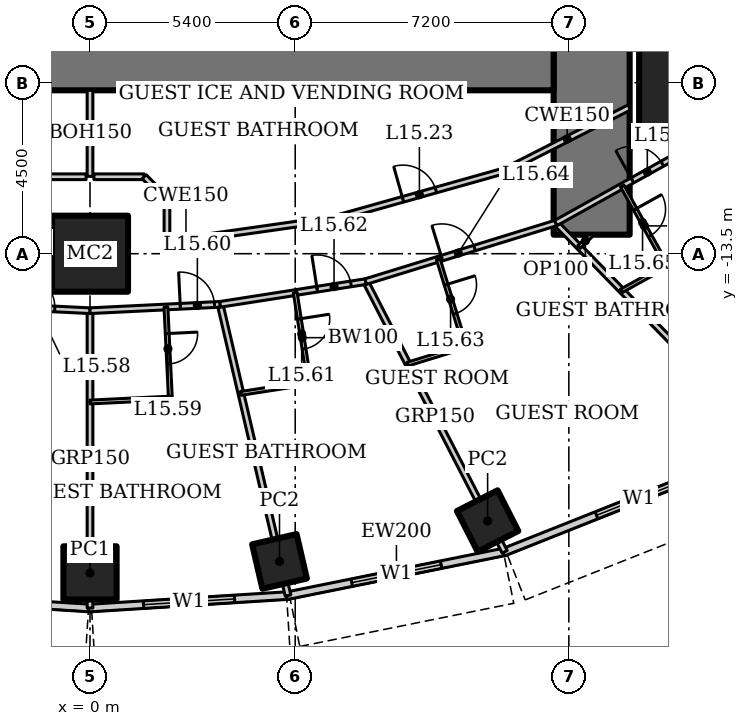
"""IFC4 building model, lengths in metres.
Left out: names, types, materials, properties, quantities, classifications, styles, units other than length and angle.
Written with IfcOpenShell. Run it as: python <this file> out.ifc"""

import sys

from ifc_helpers import new_model, si_unit, direction, frame, frame_2d, origin, origin_2d, place, context, subcontext, project, spatial, rectangle, hollow_rectangle, extrude, element, fill, save


model = new_model("IFC4")
c1 = context("Model", 3, precision=1e-05, world=origin(), true_north=direction((0.0, 1.0)))
c2 = subcontext(c1, "Body", "Model", "MODEL_VIEW")
j1 = project(units=[si_unit("LENGTHUNIT", "METRE"), si_unit("PLANEANGLEUNIT", "RADIAN")], contexts=[c1])
p1 = place(None, origin())
s1 = spatial("IfcSite", under=j1, at=p1, CompositionType="ELEMENT")
p2 = place(p1, origin())
s2 = spatial("IfcBuilding", under=s1, at=p2, CompositionType="ELEMENT")
p3 = place(p2, frame((0.0, 0.0, 69.4)))
s3 = spatial("IfcBuildingStorey", under=s2, at=p3, CompositionType="ELEMENT", Elevation=69.4)
p4 = place(p3, frame((0.0, -13.5, 0.0), z_axis=(0.0, 0.0, 1.0), x_axis=(1.0, 0.0, 0.0)))
e1 = element("IfcColumn", 1, at=p4, inside=s3, PredefinedType="COLUMN", context=c2, shape_type="SweptSolid", body=[
    extrude(hollow_rectangle(XDim=2.0, YDim=2.0, WallThickness=0.17, at=origin_2d()), origin(), (0.0, 0.0, 1.0), 3.6),
])
p5 = place(p3, frame((15.75, -9.0, 0.0), z_axis=(0.0, 0.0, 1.0), x_axis=(1.0, 0.0, 0.0)))
e2 = element("IfcColumn", 2, at=p5, inside=s3, PredefinedType="COLUMN", context=c2, shape_type="SweptSolid", body=[
    extrude(hollow_rectangle(XDim=2.6, YDim=2.6, WallThickness=0.13, at=origin_2d()), origin(), (0.0, 0.0, 1.0), 3.6),
])
p6 = place(p3, frame((0.0, -21.9, 0.0), z_axis=(0.0, 0.0, 1.0), x_axis=(1.0, 0.0, 0.0)))
e3 = element("IfcColumn", 3, at=p6, inside=s3, PredefinedType="COLUMN", context=c2, shape_type="SweptSolid", body=[
    extrude(hollow_rectangle(XDim=1.4, YDim=1.4, WallThickness=0.1, at=origin_2d()), origin(), (0.0, 0.0, 1.0), 3.6),
])
for number, where, z_axis, x_axis in (
    (4, (4.986, -21.598, 0.0), (0.0, 0.0, 1.0), (0.974, 0.225, 0.0)),
    (5, (10.463, -20.534, 0.0), (0.0, 0.0, 1.0), (0.891, 0.454, 0.0)),
):
    element("IfcColumn", number, at=place(p3, frame(where, z_axis=z_axis, x_axis=x_axis)), inside=s3, PredefinedType="COLUMN", context=c2, shape_type="SweptSolid", body=[
        extrude(hollow_rectangle(XDim=1.2, YDim=1.2, WallThickness=0.1, at=origin_2d()), origin(), (0.0, 0.0, 1.0), 3.6),
    ])
p7 = place(p3, frame((13.2, -13.0, 0.0), z_axis=(0.0, 0.0, 1.0), x_axis=(0.0, 1.0, 0.0)))
e6 = element("IfcWall", 6, at=p7, inside=s3, PredefinedType="SHEAR", context=c2, shape_type="SweptSolid", body=[
    extrude(rectangle(XDim=26.0, YDim=2.0, at=frame_2d((13.0, 0.0))), origin(), (0.0, 0.0, 1.0), 3.6),
])
p8 = place(p7, frame((12.1, 0.0, 0.0)))
e7 = element("IfcOpeningElement", 7, at=p8, cuts=e6, PredefinedType="OPENING", context=c2, shape_type="SweptSolid", body=[
    extrude(rectangle(XDim=1.8, YDim=2.1, at=frame_2d((0.9, 1.05))), frame((0.0, 1.01, 0.0), z_axis=(0.0, -1.0, 0.0), x_axis=(1.0, 0.0, 0.0)), (0.0, 0.0, 1.0), 2.02),
])
p9 = place(p3, frame((-12.2, -8.0, 0.0), z_axis=(0.0, 0.0, 1.0), x_axis=(1.0, 0.0, 0.0)))
e8 = element("IfcWall", 8, at=p9, inside=s3, PredefinedType="SHEAR", context=c2, shape_type="SweptSolid", body=[
    extrude(rectangle(XDim=24.4, YDim=2.4, at=frame_2d((12.2, 0.0))), origin(), (0.0, 0.0, 1.0), 3.6),
])
p10 = place(p3, frame((-5.253, -22.493, 0.0), z_axis=(0.0, 0.0, 1.0), x_axis=(0.998018582375, -0.062919863585, 0.0)))
e9 = element("IfcWall", 9, at=p10, inside=s3, PredefinedType="SOLIDWALL", context=c2, shape_type="SweptSolid", body=[
    extrude(rectangle(XDim=5.304, YDim=0.2, at=frame_2d((2.652, 0.0))), origin(), (0.0, 0.0, 1.0), 3.45),
])
p11 = place(p10, frame((1.452, 0.0, 0.5)))
e10 = element("IfcOpeningElement", 10, at=p11, cuts=e9, PredefinedType="OPENING", context=c2, shape_type="SweptSolid", body=[
    extrude(rectangle(XDim=2.4, YDim=2.2, at=frame_2d((1.2, 1.1))), frame((0.0, 0.11, 0.0), z_axis=(0.0, -1.0, 0.0), x_axis=(1.0, 0.0, 0.0)), (0.0, 0.0, 1.0), 0.22),
])
p12 = place(p3, frame((-0.041, -22.827, 0.0), z_axis=(0.0, 0.0, 1.0), x_axis=(0.998018582375, 0.062919863585, 0.0)))
e11 = element("IfcWall", 11, at=p12, inside=s3, PredefinedType="SOLIDWALL", context=c2, shape_type="SweptSolid", body=[
    extrude(rectangle(XDim=5.304, YDim=0.2, at=frame_2d((2.652, 0.0))), origin(), (0.0, 0.0, 1.0), 3.45),
])
p13 = place(p12, frame((1.452, 0.0, 0.5)))
e12 = element("IfcOpeningElement", 12, at=p13, cuts=e11, PredefinedType="OPENING", context=c2, shape_type="SweptSolid", body=[
    extrude(rectangle(XDim=2.4, YDim=2.2, at=frame_2d((1.2, 1.1))), frame((0.0, 0.11, 0.0), z_axis=(0.0, -1.0, 0.0), x_axis=(1.0, 0.0, 0.0)), (0.0, 0.0, 1.0), 0.22),
])
p14 = place(p3, frame((5.17, -22.504, 0.0), z_axis=(0.0, 0.0, 1.0), x_axis=(0.980251657452, 0.197754110105, 0.0)))
e13 = element("IfcWall", 13, at=p14, inside=s3, PredefinedType="SOLIDWALL", context=c2, shape_type="SweptSolid", body=[
    extrude(rectangle(XDim=5.904, YDim=0.2, at=frame_2d((2.952, 0.0))), origin(), (0.0, 0.0, 1.0), 3.45),
])
p15 = place(p14, frame((1.752, 0.0, 0.5)))
e14 = element("IfcOpeningElement", 14, at=p15, cuts=e13, PredefinedType="OPENING", context=c2, shape_type="SweptSolid", body=[
    extrude(rectangle(XDim=2.4, YDim=2.2, at=frame_2d((1.2, 1.1))), frame((0.0, 0.11, 0.0), z_axis=(0.0, -1.0, 0.0), x_axis=(1.0, 0.0, 0.0)), (0.0, 0.0, 1.0), 0.22),
])
p16 = place(p3, frame((10.869, -21.363, 0.0), z_axis=(0.0, 0.0, 1.0), x_axis=(0.929358351251, 0.369178892895, 0.0)))
e15 = element("IfcWall", 15, at=p16, inside=s3, PredefinedType="SOLIDWALL", context=c2, shape_type="SweptSolid", body=[
    extrude(rectangle(XDim=7.692, YDim=0.2, at=frame_2d((3.846, 0.0))), origin(), (0.0, 0.0, 1.0), 3.45),
])
p17 = place(p16, frame((2.646, 0.0, 0.5)))
e16 = element("IfcOpeningElement", 16, at=p17, cuts=e15, PredefinedType="OPENING", context=c2, shape_type="SweptSolid", body=[
    extrude(rectangle(XDim=2.4, YDim=2.2, at=frame_2d((1.2, 1.1))), frame((0.0, 0.11, 0.0), z_axis=(0.0, -1.0, 0.0), x_axis=(1.0, 0.0, 0.0)), (0.0, 0.0, 1.0), 0.22),
])
p18 = place(p3, frame((0.0, -22.825, 0.0), z_axis=(0.0, 0.0, 1.0), x_axis=(0.0, 1.0, 0.0)))
e17 = element("IfcWall", 17, at=p18, inside=s3, PredefinedType="PARTITIONING", context=c2, shape_type="SweptSolid", body=[
    extrude(rectangle(XDim=7.825, YDim=0.15, at=frame_2d((3.912, 0.0))), origin(), (0.0, 0.0, 1.0), 2.924),
])
p19 = place(p3, frame((5.211, -22.496, 0.0), z_axis=(0.0, 0.0, 1.0), x_axis=(-0.227056984461, 0.973881474209, 0.0)))
e18 = element("IfcWall", 18, at=p19, inside=s3, PredefinedType="PARTITIONING", context=c2, shape_type="SweptSolid", body=[
    extrude(rectangle(XDim=7.869, YDim=0.15, at=frame_2d((3.934, 0.0))), origin(), (0.0, 0.0, 1.0), 2.767),
])
p20 = place(p3, frame((10.912, -21.346, 0.0), z_axis=(0.0, 0.0, 1.0), x_axis=(-0.45752665959, 0.889195904042, 0.0)))
e19 = element("IfcWall", 19, at=p20, inside=s3, PredefinedType="PARTITIONING", context=c2, shape_type="SweptSolid", body=[
    extrude(rectangle(XDim=7.997, YDim=0.15, at=frame_2d((3.999, 0.0))), origin(), (0.0, 0.0, 1.0), 2.528),
])
p21 = place(p3, frame((17.97, -18.542, 0.0), z_axis=(0.0, 0.0, 1.0), x_axis=(-0.698757291878, 0.715358823981, 0.0)))
e20 = element("IfcWall", 20, at=p21, inside=s3, PredefinedType="PARTITIONING", context=c2, shape_type="SweptSolid", body=[
    extrude(rectangle(XDim=8.177, YDim=0.15, at=frame_2d((4.088, 0.0))), origin(), (0.0, 0.0, 1.0), 2.528),
])
p22 = place(p3, frame((-3.424, -14.833, 0.0), z_axis=(0.0, 0.0, 1.0), x_axis=(0.998809560203, -0.048779733975, 0.0)))
e21 = element("IfcWall", 21, at=p22, inside=s3, PredefinedType="PARTITIONING", context=c2, shape_type="SweptSolid", body=[
    extrude(rectangle(XDim=3.428, YDim=0.15, at=frame_2d((1.714, 0.0))), origin(), (0.0, 0.0, 1.0), 3.45),
])
p23 = place(p22, frame((1.6, 0.0, 0.0)))
e22 = element("IfcOpeningElement", 22, at=p23, cuts=e21, PredefinedType="OPENING", context=c2, shape_type="SweptSolid", body=[
    extrude(rectangle(XDim=0.9, YDim=2.1, at=frame_2d((0.45, 1.05))), frame((0.0, 0.085, 0.0), z_axis=(0.0, -1.0, 0.0), x_axis=(1.0, 0.0, 0.0)), (0.0, 0.0, 1.0), 0.17),
])
p24 = place(p3, frame((0.0, -15.0, 0.0), z_axis=(0.0, 0.0, 1.0), x_axis=(0.998809560203, 0.048779733975, 0.0)))
e23 = element("IfcWall", 23, at=p24, inside=s3, PredefinedType="PARTITIONING", context=c2, shape_type="SweptSolid", body=[
    extrude(rectangle(XDim=3.428, YDim=0.15, at=frame_2d((1.714, 0.0))), origin(), (0.0, 0.0, 1.0), 3.45),
])
p25 = place(p24, frame((2.378, 0.0, 0.0)))
e24 = element("IfcOpeningElement", 24, at=p25, cuts=e23, PredefinedType="OPENING", context=c2, shape_type="SweptSolid", body=[
    extrude(rectangle(XDim=0.9, YDim=2.1, at=frame_2d((0.45, 1.05))), frame((0.0, 0.085, 0.0), z_axis=(0.0, -1.0, 0.0), x_axis=(1.0, 0.0, 0.0)), (0.0, 0.0, 1.0), 0.17),
])
p26 = place(p3, frame((3.424, -14.833, 0.0), z_axis=(0.0, 0.0, 1.0), x_axis=(0.988015036573, 0.154357660987, 0.0)))
e25 = element("IfcWall", 25, at=p26, inside=s3, PredefinedType="PARTITIONING", context=c2, shape_type="SweptSolid", body=[
    extrude(rectangle(XDim=3.875, YDim=0.15, at=frame_2d((1.938, 0.0))), origin(), (0.0, 0.0, 1.0), 3.45),
])
p27 = place(p26, frame((2.583, 0.0, 0.0)))
e26 = element("IfcOpeningElement", 26, at=p27, cuts=e25, PredefinedType="OPENING", context=c2, shape_type="SweptSolid", body=[
    extrude(rectangle(XDim=0.9, YDim=2.1, at=frame_2d((0.45, 1.05))), frame((0.0, 0.085, 0.0), z_axis=(0.0, -1.0, 0.0), x_axis=(1.0, 0.0, 0.0)), (0.0, 0.0, 1.0), 0.17),
])
p28 = place(p3, frame((7.253, -14.235, 0.0), z_axis=(0.0, 0.0, 1.0), x_axis=(0.955657956744, 0.294478980085, 0.0)))
e27 = element("IfcWall", 27, at=p28, inside=s3, PredefinedType="PARTITIONING", context=c2, shape_type="SweptSolid", body=[
    extrude(rectangle(XDim=5.236, YDim=0.15, at=frame_2d((2.618, 0.0))), origin(), (0.0, 0.0, 1.0), 3.45),
])
p29 = place(p28, frame((2.1, 0.0, 0.0)))
e28 = element("IfcOpeningElement", 28, at=p29, cuts=e27, PredefinedType="OPENING", context=c2, shape_type="SweptSolid", body=[
    extrude(rectangle(XDim=0.9, YDim=2.1, at=frame_2d((0.45, 1.05))), frame((0.0, 0.085, 0.0), z_axis=(0.0, -1.0, 0.0), x_axis=(1.0, 0.0, 0.0)), (0.0, 0.0, 1.0), 0.17),
])
p30 = place(p3, frame((12.257, -12.693, 0.0), z_axis=(0.0, 0.0, 1.0), x_axis=(0.873695910579, 0.486472461541, 0.0)))
e29 = element("IfcWall", 29, at=p30, inside=s3, PredefinedType="PARTITIONING", context=c2, shape_type="SweptSolid", body=[
    extrude(rectangle(XDim=5.771, YDim=0.15, at=frame_2d((2.885, 0.0))), origin(), (0.0, 0.0, 1.0), 3.45),
])
p31 = place(p30, frame((2.306, 0.0, 0.0)))
e30 = element("IfcOpeningElement", 30, at=p31, cuts=e29, PredefinedType="OPENING", context=c2, shape_type="SweptSolid", body=[
    extrude(rectangle(XDim=0.9, YDim=2.1, at=frame_2d((0.45, 1.05))), frame((0.0, 0.085, 0.0), z_axis=(0.0, -1.0, 0.0), x_axis=(1.0, 0.0, 0.0)), (0.0, 0.0, 1.0), 0.17),
])
p32 = place(p3, frame((3.016, -13.066, 0.0), z_axis=(0.0, 0.0, 1.0), x_axis=(0.990002114939, 0.14105251652, 0.0)))
e31 = element("IfcWall", 31, at=p32, inside=s3, PredefinedType="PARTITIONING", context=c2, shape_type="SweptSolid", body=[
    extrude(rectangle(XDim=3.429, YDim=0.15, at=frame_2d((1.714, 0.0))), origin(), (0.0, 0.0, 1.0), 3.45),
])
p33 = place(p3, frame((6.411, -12.582, 0.0), z_axis=(0.0, 0.0, 1.0), x_axis=(0.962643729928, 0.270771211967, 0.0)))
e32 = element("IfcWall", 32, at=p33, inside=s3, PredefinedType="PARTITIONING", context=c2, shape_type="SweptSolid", body=[
    extrude(rectangle(XDim=4.688, YDim=0.15, at=frame_2d((2.344, 0.0))), origin(), (0.0, 0.0, 1.0), 3.45),
])
p34 = place(p33, frame((1.894, 0.0, 0.0)))
e33 = element("IfcOpeningElement", 33, at=p34, cuts=e32, PredefinedType="OPENING", context=c2, shape_type="SweptSolid", body=[
    extrude(rectangle(XDim=0.9, YDim=2.1, at=frame_2d((0.45, 1.05))), frame((0.0, 0.085, 0.0), z_axis=(0.0, -1.0, 0.0), x_axis=(1.0, 0.0, 0.0)), (0.0, 0.0, 1.0), 0.17),
])
p35 = place(p3, frame((1.998, -14.903, 0.0), z_axis=(0.0, 0.0, 1.0), x_axis=(0.048831470304, -0.998807032168, 0.0)))
e34 = element("IfcWall", 34, at=p35, inside=s3, PredefinedType="PARTITIONING", context=c2, shape_type="SweptSolid", body=[
    extrude(rectangle(XDim=2.4, YDim=0.1, at=frame_2d((1.2, 0.0))), origin(), (0.0, 0.0, 1.0), 2.749),
])
p36 = place(p35, frame((0.7, 0.0, 0.0)))
e35 = element("IfcOpeningElement", 35, at=p36, cuts=e34, PredefinedType="OPENING", context=c2, shape_type="SweptSolid", body=[
    extrude(rectangle(XDim=0.8, YDim=2.1, at=frame_2d((0.4, 1.05))), frame((0.0, 0.06, 0.0), z_axis=(0.0, -1.0, 0.0), x_axis=(1.0, 0.0, 0.0)), (0.0, 0.0, 1.0), 0.12),
])
p37 = place(p3, frame((2.115, -17.3, 0.0), z_axis=(0.0, 0.0, 1.0), x_axis=(-0.998809749254, -0.048775862842, 0.0)))
e36 = element("IfcWall", 36, at=p37, inside=s3, PredefinedType="PARTITIONING", context=c2, shape_type="SweptSolid", body=[
    extrude(rectangle(XDim=2.117, YDim=0.1, at=frame_2d((1.059, 0.0))), origin(), (0.0, 0.0, 1.0), 3.45),
])
p38 = place(p3, frame((5.4, -14.524, 0.0), z_axis=(0.0, 0.0, 1.0), x_axis=(0.154426532979, -0.988004274238, 0.0)))
e37 = element("IfcWall", 37, at=p38, inside=s3, PredefinedType="PARTITIONING", context=c2, shape_type="SweptSolid", body=[
    extrude(rectangle(XDim=2.4, YDim=0.1, at=frame_2d((1.2, 0.0))), origin(), (0.0, 0.0, 1.0), 3.45),
])
p39 = place(p38, frame((0.7, 0.0, 0.0)))
e38 = element("IfcOpeningElement", 38, at=p39, cuts=e37, PredefinedType="OPENING", context=c2, shape_type="SweptSolid", body=[
    extrude(rectangle(XDim=0.8, YDim=2.1, at=frame_2d((0.4, 1.05))), frame((0.0, 0.06, 0.0), z_axis=(0.0, -1.0, 0.0), x_axis=(1.0, 0.0, 0.0)), (0.0, 0.0, 1.0), 0.12),
])
p40 = place(p3, frame((5.771, -16.895, 0.0), z_axis=(0.0, 0.0, 1.0), x_axis=(-0.98801840204, -0.154336117711, 0.0)))
e39 = element("IfcWall", 39, at=p40, inside=s3, PredefinedType="PARTITIONING", context=c2, shape_type="SweptSolid", body=[
    extrude(rectangle(XDim=1.827, YDim=0.1, at=frame_2d((0.914, 0.0))), origin(), (0.0, 0.0, 1.0), 3.45),
])
p41 = place(p3, frame((9.164, -13.646, 0.0), z_axis=(0.0, 0.0, 1.0), x_axis=(0.294507586191, -0.955649141514, 0.0)))
e40 = element("IfcWall", 40, at=p41, inside=s3, PredefinedType="PARTITIONING", context=c2, shape_type="SweptSolid", body=[
    extrude(rectangle(XDim=2.4, YDim=0.1, at=frame_2d((1.2, 0.0))), origin(), (0.0, 0.0, 1.0), 3.45),
])
p42 = place(p41, frame((0.7, 0.0, 0.0)))
e41 = element("IfcOpeningElement", 41, at=p42, cuts=e40, PredefinedType="OPENING", context=c2, shape_type="SweptSolid", body=[
    extrude(rectangle(XDim=0.8, YDim=2.1, at=frame_2d((0.4, 1.05))), frame((0.0, 0.06, 0.0), z_axis=(0.0, -1.0, 0.0), x_axis=(1.0, 0.0, 0.0)), (0.0, 0.0, 1.0), 0.12),
])
p43 = place(p3, frame((9.871, -15.939, 0.0), z_axis=(0.0, 0.0, 1.0), x_axis=(-0.955642133669, -0.29453032502, 0.0)))
e42 = element("IfcWall", 42, at=p43, inside=s3, PredefinedType="PARTITIONING", context=c2, shape_type="SweptSolid", body=[
    extrude(rectangle(XDim=1.583, YDim=0.1, at=frame_2d((0.791, 0.0))), origin(), (0.0, 0.0, 1.0), 3.45),
])
p44 = place(p3, frame((14.004, -11.719, 0.0), z_axis=(0.0, 0.0, 1.0), x_axis=(0.486445964861, -0.873710663361, 0.0)))
e43 = element("IfcWall", 43, at=p44, inside=s3, PredefinedType="PARTITIONING", context=c2, shape_type="SweptSolid", body=[
    extrude(rectangle(XDim=2.4, YDim=0.1, at=frame_2d((1.2, 0.0))), origin(), (0.0, 0.0, 1.0), 3.45),
])
p45 = place(p44, frame((0.7, 0.0, 0.0)))
e44 = element("IfcOpeningElement", 44, at=p45, cuts=e43, PredefinedType="OPENING", context=c2, shape_type="SweptSolid", body=[
    extrude(rectangle(XDim=0.8, YDim=2.1, at=frame_2d((0.4, 1.05))), frame((0.0, 0.06, 0.0), z_axis=(0.0, -1.0, 0.0), x_axis=(1.0, 0.0, 0.0)), (0.0, 0.0, 1.0), 0.12),
])
p46 = place(p3, frame((15.172, -13.816, 0.0), z_axis=(0.0, 0.0, 1.0), x_axis=(-0.873640924532, -0.486571202377, 0.0)))
e45 = element("IfcWall", 45, at=p46, inside=s3, PredefinedType="PARTITIONING", context=c2, shape_type="SweptSolid", body=[
    extrude(rectangle(XDim=1.362, YDim=0.1, at=frame_2d((0.681, 0.0))), origin(), (0.0, 0.0, 1.0), 3.45),
])
p47 = place(p3, frame((13.2, -13.0, 0.0), z_axis=(0.0, 0.0, 1.0), x_axis=(-0.715289751842, -0.698827998087, 0.0)))
e46 = element("IfcWall", 46, at=p47, inside=s3, PredefinedType="PARTITIONING", context=c2, shape_type="SweptSolid", body=[
    extrude(rectangle(XDim=0.46, YDim=0.1, at=frame_2d((0.23, 0.0))), origin(), (0.0, 0.0, 1.0), 3.45),
])
p48 = place(p3, frame((2.035, -13.109, 0.0), z_axis=(0.0, 0.0, 1.0), x_axis=(0.999010128674, 0.044483286824, 0.0)))
e47 = element("IfcWall", 47, at=p48, inside=s3, PredefinedType="PARTITIONING", context=c2, shape_type="SweptSolid", body=[
    extrude(rectangle(XDim=0.982, YDim=0.15, at=frame_2d((0.491, 0.0))), origin(), (0.0, 0.0, 1.0), 3.45),
])
p49 = place(p3, frame((0.0, -9.2, 0.0), z_axis=(0.0, 0.0, 1.0), x_axis=(0.0, -1.0, 0.0)))
e48 = element("IfcWall", 48, at=p49, inside=s3, PredefinedType="PARTITIONING", context=c2, shape_type="SweptSolid", body=[
    extrude(rectangle(XDim=2.265, YDim=0.15, at=frame_2d((1.133, 0.0))), origin(), (0.0, 0.0, 1.0), 3.044),
])
for number, where, z_axis, x_axis in (
    (49, (-1.425, -11.475, 0.0), (0.0, 0.0, 1.0), (1.0, 0.0, 0.0)),
    (50, (0.103, -11.475, 0.0), (0.0, 0.0, 1.0), (1.0, 0.0, 0.0)),
):
    element("IfcWall", number, at=place(p3, frame(where, z_axis=z_axis, x_axis=x_axis)), inside=s3, PredefinedType="PARTITIONING", context=c2, shape_type="SweptSolid", body=[
        extrude(rectangle(XDim=1.321, YDim=0.15, at=frame_2d((0.661, 0.0))), origin(), (0.0, 0.0, 1.0), 3.45),
    ])
p50 = place(p3, frame((1.425, -11.475, 0.0), z_axis=(0.0, 0.0, 1.0), x_axis=(0.707106781187, -0.707106781187, 0.0)))
e51 = element("IfcWall", 51, at=p50, inside=s3, PredefinedType="PARTITIONING", context=c2, shape_type="SweptSolid", body=[
    extrude(rectangle(XDim=0.849, YDim=0.15, at=frame_2d((0.425, 0.0))), origin(), (0.0, 0.0, 1.0), 3.45),
])
p51 = place(p3, frame((2.025, -12.075, 0.0), z_axis=(0.0, 0.0, 1.0), x_axis=(0.0, -1.0, 0.0)))
e52 = element("IfcWall", 52, at=p51, inside=s3, PredefinedType="PARTITIONING", context=c2, shape_type="SweptSolid", body=[
    extrude(rectangle(XDim=0.93, YDim=0.15, at=frame_2d((0.465, 0.0))), origin(), (0.0, 0.0, 1.0), 2.749),
])
p52 = place(p3, frame((10.924, -11.312, 0.0), z_axis=(0.0, 0.0, 1.0), x_axis=(0.891394713219, 0.453227829292, 0.0)))
e53 = element("IfcWall", 53, at=p52, inside=s3, PredefinedType="PARTITIONING", context=c2, shape_type="SweptSolid", body=[
    extrude(rectangle(XDim=3.664, YDim=0.15, at=frame_2d((1.832, 0.0))), origin(), (0.0, 0.0, 1.0), 3.45),
])
p53 = place(p13, origin())
e54 = element("IfcWindow", 54, at=p53, inside=s3, PartitioningType="SINGLE_PANEL", PredefinedType="WINDOW", context=c2, shape_type="SweptSolid", body=[
    extrude(rectangle(XDim=2.4, YDim=2.2, at=frame_2d((1.2, 1.1))), frame((0.0, 0.03, 0.0), z_axis=(0.0, -1.0, 0.0), x_axis=(1.0, 0.0, 0.0)), (0.0, 0.0, 1.0), 0.06),
])
fill(e12, e54)
p54 = place(p15, origin())
e55 = element("IfcWindow", 55, at=p54, inside=s3, PartitioningType="SINGLE_PANEL", PredefinedType="WINDOW", context=c2, shape_type="SweptSolid", body=[
    extrude(rectangle(XDim=2.4, YDim=2.2, at=frame_2d((1.2, 1.1))), frame((0.0, 0.03, 0.0), z_axis=(0.0, -1.0, 0.0), x_axis=(1.0, 0.0, 0.0)), (0.0, 0.0, 1.0), 0.06),
])
fill(e14, e55)
p55 = place(p17, origin())
e56 = element("IfcWindow", 56, at=p55, inside=s3, PartitioningType="SINGLE_PANEL", PredefinedType="WINDOW", context=c2, shape_type="SweptSolid", body=[
    extrude(rectangle(XDim=2.4, YDim=2.2, at=frame_2d((1.2, 1.1))), frame((0.0, 0.03, 0.0), z_axis=(0.0, -1.0, 0.0), x_axis=(1.0, 0.0, 0.0)), (0.0, 0.0, 1.0), 0.06),
])
fill(e16, e56)
p56 = place(p34, origin())
e57 = element("IfcDoor", 57, at=p56, inside=s3, OperationType="SINGLE_SWING_LEFT", PredefinedType="DOOR", context=c2, shape_type="SweptSolid", body=[
    extrude(rectangle(XDim=0.9, YDim=2.1, at=frame_2d((0.45, 1.05))), frame((0.0, 0.025, 0.0), z_axis=(0.0, -1.0, 0.0), x_axis=(1.0, 0.0, 0.0)), (0.0, 0.0, 1.0), 0.05),
])
fill(e33, e57)
p57 = place(p23, origin())
e58 = element("IfcDoor", 58, at=p57, inside=s3, OperationType="SINGLE_SWING_LEFT", PredefinedType="DOOR", context=c2, shape_type="SweptSolid", body=[
    extrude(rectangle(XDim=0.9, YDim=2.1, at=frame_2d((0.45, 1.05))), frame((0.0, 0.025, 0.0), z_axis=(0.0, -1.0, 0.0), x_axis=(1.0, 0.0, 0.0)), (0.0, 0.0, 1.0), 0.05),
])
fill(e22, e58)
p58 = place(p36, origin())
e59 = element("IfcDoor", 59, at=p58, inside=s3, OperationType="SINGLE_SWING_LEFT", PredefinedType="DOOR", context=c2, shape_type="SweptSolid", body=[
    extrude(rectangle(XDim=0.8, YDim=2.1, at=frame_2d((0.4, 1.05))), frame((0.0, 0.025, 0.0), z_axis=(0.0, -1.0, 0.0), x_axis=(1.0, 0.0, 0.0)), (0.0, 0.0, 1.0), 0.05),
])
fill(e35, e59)
p59 = place(p25, origin())
e60 = element("IfcDoor", 60, at=p59, inside=s3, OperationType="SINGLE_SWING_LEFT", PredefinedType="DOOR", context=c2, shape_type="SweptSolid", body=[
    extrude(rectangle(XDim=0.9, YDim=2.1, at=frame_2d((0.45, 1.05))), frame((0.0, 0.025, 0.0), z_axis=(0.0, -1.0, 0.0), x_axis=(1.0, 0.0, 0.0)), (0.0, 0.0, 1.0), 0.05),
])
fill(e24, e60)
p60 = place(p39, origin())
e61 = element("IfcDoor", 61, at=p60, inside=s3, OperationType="SINGLE_SWING_LEFT", PredefinedType="DOOR", context=c2, shape_type="SweptSolid", body=[
    extrude(rectangle(XDim=0.8, YDim=2.1, at=frame_2d((0.4, 1.05))), frame((0.0, 0.025, 0.0), z_axis=(0.0, -1.0, 0.0), x_axis=(1.0, 0.0, 0.0)), (0.0, 0.0, 1.0), 0.05),
])
fill(e38, e61)
p61 = place(p27, origin())
e62 = element("IfcDoor", 62, at=p61, inside=s3, OperationType="SINGLE_SWING_LEFT", PredefinedType="DOOR", context=c2, shape_type="SweptSolid", body=[
    extrude(rectangle(XDim=0.9, YDim=2.1, at=frame_2d((0.45, 1.05))), frame((0.0, 0.025, 0.0), z_axis=(0.0, -1.0, 0.0), x_axis=(1.0, 0.0, 0.0)), (0.0, 0.0, 1.0), 0.05),
])
fill(e26, e62)
p62 = place(p42, origin())
e63 = element("IfcDoor", 63, at=p62, inside=s3, OperationType="SINGLE_SWING_LEFT", PredefinedType="DOOR", context=c2, shape_type="SweptSolid", body=[
    extrude(rectangle(XDim=0.8, YDim=2.1, at=frame_2d((0.4, 1.05))), frame((0.0, 0.025, 0.0), z_axis=(0.0, -1.0, 0.0), x_axis=(1.0, 0.0, 0.0)), (0.0, 0.0, 1.0), 0.05),
])
fill(e41, e63)
p63 = place(p29, origin())
e64 = element("IfcDoor", 64, at=p63, inside=s3, OperationType="SINGLE_SWING_LEFT", PredefinedType="DOOR", context=c2, shape_type="SweptSolid", body=[
    extrude(rectangle(XDim=0.9, YDim=2.1, at=frame_2d((0.45, 1.05))), frame((0.0, 0.025, 0.0), z_axis=(0.0, -1.0, 0.0), x_axis=(1.0, 0.0, 0.0)), (0.0, 0.0, 1.0), 0.05),
])
fill(e28, e64)
p64 = place(p45, origin())
e65 = element("IfcDoor", 65, at=p64, inside=s3, OperationType="SINGLE_SWING_LEFT", PredefinedType="DOOR", context=c2, shape_type="SweptSolid", body=[
    extrude(rectangle(XDim=0.8, YDim=2.1, at=frame_2d((0.4, 1.05))), frame((0.0, 0.025, 0.0), z_axis=(0.0, -1.0, 0.0), x_axis=(1.0, 0.0, 0.0)), (0.0, 0.0, 1.0), 0.05),
])
fill(e44, e65)
p65 = place(p31, origin())
e66 = element("IfcDoor", 66, at=p65, inside=s3, OperationType="SINGLE_SWING_LEFT", PredefinedType="DOOR", context=c2, shape_type="SweptSolid", body=[
    extrude(rectangle(XDim=0.9, YDim=2.1, at=frame_2d((0.45, 1.05))), frame((0.0, 0.025, 0.0), z_axis=(0.0, -1.0, 0.0), x_axis=(1.0, 0.0, 0.0)), (0.0, 0.0, 1.0), 0.05),
])
fill(e30, e66)
save(model, sys.argv[1])
